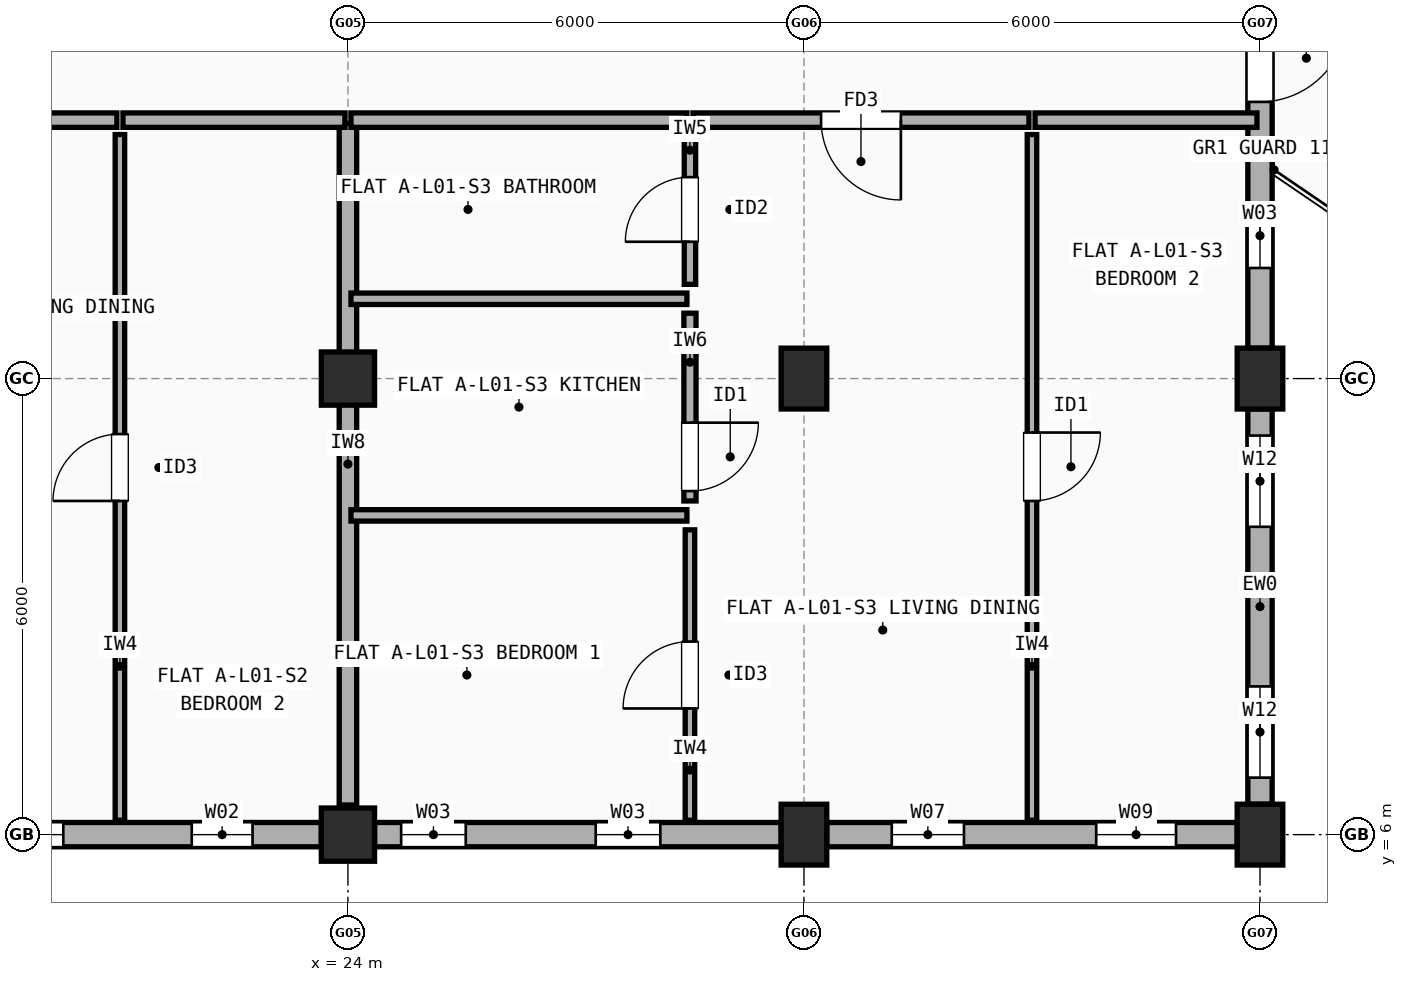
"""IFC4 building model, lengths in metres.
Left out: names, types, materials, properties, quantities, classifications, styles, units other than length and angle.
Written with IfcOpenShell. Run it as: python <this file> out.ifc"""

import sys

from ifc_helpers import new_model, si_unit, direction, frame, frame_2d, origin, origin_2d, place, context, subcontext, project, spatial, rectangle, extrude, element, fill, save


model = new_model("IFC4")
c1 = context("Model", 3, precision=1e-05, world=origin(), true_north=direction((0.0, 1.0)))
c2 = subcontext(c1, "Body", "Model", "MODEL_VIEW")
j1 = project(units=[si_unit("LENGTHUNIT", "METRE"), si_unit("PLANEANGLEUNIT", "RADIAN")], contexts=[c1])
p1 = place(None, origin())
s1 = spatial("IfcSite", under=j1, at=p1, CompositionType="ELEMENT")
p2 = place(p1, origin())
s2 = spatial("IfcBuilding", under=s1, at=p2, CompositionType="ELEMENT")
p3 = place(p2, frame((0.0, 0.0, 4.5)))
s3 = spatial("IfcBuildingStorey", under=s2, at=p3, CompositionType="ELEMENT", Elevation=4.5)
for number, where, z_axis, x_axis in (
    (1, (24.0, 6.0, 0.0), (0.0, 0.0, 1.0), (1.0, 0.0, 0.0)),
    (2, (24.0, 12.0, 0.0), (0.0, 0.0, 1.0), (1.0, 0.0, 0.0)),
):
    element("IfcColumn", number, at=place(p3, frame(where, z_axis=z_axis, x_axis=x_axis)), inside=s3, PredefinedType="COLUMN", context=c2, shape_type="SweptSolid", body=[
        extrude(rectangle(XDim=0.7, YDim=0.7, at=origin_2d()), origin(), (0.0, 0.0, 1.0), 2.945),
    ])
for number, where, z_axis, x_axis in (
    (3, (30.0, 6.0, 0.0), (0.0, 0.0, 1.0), (1.0, 0.0, 0.0)),
    (4, (30.0, 12.0, 0.0), (0.0, 0.0, 1.0), (1.0, 0.0, 0.0)),
    (5, (36.0, 6.0, 0.0), (0.0, 0.0, 1.0), (1.0, 0.0, 0.0)),
    (6, (36.0, 12.0, 0.0), (0.0, 0.0, 1.0), (1.0, 0.0, 0.0)),
):
    element("IfcColumn", number, at=place(p3, frame(where, z_axis=z_axis, x_axis=x_axis)), inside=s3, PredefinedType="COLUMN", context=c2, shape_type="SweptSolid", body=[
        extrude(rectangle(XDim=0.6, YDim=0.8, at=origin_2d()), origin(), (0.0, 0.0, 1.0), 2.945),
    ])
p4 = place(p3, frame((18.35, 6.0, 0.0), z_axis=(0.0, 0.0, 1.0), x_axis=(1.0, 0.0, 0.0)))
e7 = element("IfcWall", 7, at=p4, inside=s3, PredefinedType="STANDARD", context=c2, shape_type="SweptSolid", body=[
    extrude(rectangle(XDim=5.3, YDim=0.32, at=frame_2d((2.65, 0.0))), origin(), (0.0, 0.0, 1.0), 2.427),
])
p5 = place(p4, frame((0.705, 0.0, 0.9)))
e8 = element("IfcOpeningElement", 8, at=p5, cuts=e7, PredefinedType="OPENING", context=c2, shape_type="SweptSolid", body=[
    extrude(rectangle(XDim=1.2, YDim=1.35, at=frame_2d((0.6, 0.675))), frame((0.0, 0.17, 0.0), z_axis=(0.0, -1.0, 0.0), x_axis=(1.0, 0.0, 0.0)), (0.0, 0.0, 1.0), 0.34),
])
p6 = place(p4, frame((3.595, 0.0, 0.9)))
e9 = element("IfcOpeningElement", 9, at=p6, cuts=e7, PredefinedType="OPENING", context=c2, shape_type="SweptSolid", body=[
    extrude(rectangle(XDim=0.8, YDim=1.2, at=frame_2d((0.4, 0.6))), frame((0.0, 0.17, 0.0), z_axis=(0.0, -1.0, 0.0), x_axis=(1.0, 0.0, 0.0)), (0.0, 0.0, 1.0), 0.34),
])
p7 = place(p3, frame((24.35, 6.0, 0.0), z_axis=(0.0, 0.0, 1.0), x_axis=(1.0, 0.0, 0.0)))
e10 = element("IfcWall", 10, at=p7, inside=s3, PredefinedType="STANDARD", context=c2, shape_type="SweptSolid", body=[
    extrude(rectangle(XDim=5.35, YDim=0.32, at=frame_2d((2.675, 0.0))), origin(), (0.0, 0.0, 1.0), 2.427),
])
p8 = place(p7, frame((0.35, 0.0, 0.9)))
e11 = element("IfcOpeningElement", 11, at=p8, cuts=e10, PredefinedType="OPENING", context=c2, shape_type="SweptSolid", body=[
    extrude(rectangle(XDim=0.85, YDim=1.25, at=frame_2d((0.425, 0.625))), frame((0.0, 0.17, 0.0), z_axis=(0.0, -1.0, 0.0), x_axis=(1.0, 0.0, 0.0)), (0.0, 0.0, 1.0), 0.34),
])
p9 = place(p7, frame((2.91, 0.0, 0.9)))
e12 = element("IfcOpeningElement", 12, at=p9, cuts=e10, PredefinedType="OPENING", context=c2, shape_type="SweptSolid", body=[
    extrude(rectangle(XDim=0.85, YDim=1.25, at=frame_2d((0.425, 0.625))), frame((0.0, 0.17, 0.0), z_axis=(0.0, -1.0, 0.0), x_axis=(1.0, 0.0, 0.0)), (0.0, 0.0, 1.0), 0.34),
])
p10 = place(p3, frame((30.3, 6.0, 0.0), z_axis=(0.0, 0.0, 1.0), x_axis=(1.0, 0.0, 0.0)))
e13 = element("IfcWall", 13, at=p10, inside=s3, PredefinedType="STANDARD", context=c2, shape_type="SweptSolid", body=[
    extrude(rectangle(XDim=5.4, YDim=0.32, at=frame_2d((2.7, 0.0))), origin(), (0.0, 0.0, 1.0), 2.427),
])
p11 = place(p10, frame((0.855, 0.0, 0.9)))
e14 = element("IfcOpeningElement", 14, at=p11, cuts=e13, PredefinedType="OPENING", context=c2, shape_type="SweptSolid", body=[
    extrude(rectangle(XDim=0.95, YDim=1.35, at=frame_2d((0.475, 0.675))), frame((0.0, 0.17, 0.0), z_axis=(0.0, -1.0, 0.0), x_axis=(1.0, 0.0, 0.0)), (0.0, 0.0, 1.0), 0.34),
])
p12 = place(p10, frame((3.545, 0.0, 0.9)))
e15 = element("IfcOpeningElement", 15, at=p12, cuts=e13, PredefinedType="OPENING", context=c2, shape_type="SweptSolid", body=[
    extrude(rectangle(XDim=1.05, YDim=1.35, at=frame_2d((0.525, 0.675))), frame((0.0, 0.17, 0.0), z_axis=(0.0, -1.0, 0.0), x_axis=(1.0, 0.0, 0.0)), (0.0, 0.0, 1.0), 0.34),
])
p13 = place(p3, frame((36.0, 6.4, 0.0), z_axis=(0.0, 0.0, 1.0), x_axis=(0.0, 1.0, 0.0)))
e16 = element("IfcWall", 16, at=p13, inside=s3, PredefinedType="STANDARD", context=c2, shape_type="SweptSolid", body=[
    extrude(rectangle(XDim=5.2, YDim=0.32, at=frame_2d((2.6, 0.0))), origin(), (0.0, 0.0, 1.0), 2.427),
])
p14 = place(p13, frame((0.35, 0.0, 0.9)))
e17 = element("IfcOpeningElement", 17, at=p14, cuts=e16, PredefinedType="OPENING", context=c2, shape_type="SweptSolid", body=[
    extrude(rectangle(XDim=1.2, YDim=1.35, at=frame_2d((0.6, 0.675))), frame((0.0, 0.17, 0.0), z_axis=(0.0, -1.0, 0.0), x_axis=(1.0, 0.0, 0.0)), (0.0, 0.0, 1.0), 0.34),
])
p15 = place(p13, frame((3.65, 0.0, 0.9)))
e18 = element("IfcOpeningElement", 18, at=p15, cuts=e16, PredefinedType="OPENING", context=c2, shape_type="SweptSolid", body=[
    extrude(rectangle(XDim=1.2, YDim=1.35, at=frame_2d((0.6, 0.675))), frame((0.0, 0.17, 0.0), z_axis=(0.0, -1.0, 0.0), x_axis=(1.0, 0.0, 0.0)), (0.0, 0.0, 1.0), 0.34),
])
p16 = place(p3, frame((36.0, 12.4, 0.0), z_axis=(0.0, 0.0, 1.0), x_axis=(0.0, 1.0, 0.0)))
e19 = element("IfcWall", 19, at=p16, inside=s3, PredefinedType="STANDARD", context=c2, shape_type="SweptSolid", body=[
    extrude(rectangle(XDim=5.2, YDim=0.32, at=frame_2d((2.6, 0.0))), origin(), (0.0, 0.0, 1.0), 2.427),
])
p17 = place(p16, frame((3.24, 0.0, 0.0)))
e20 = element("IfcOpeningElement", 20, at=p17, cuts=e19, PredefinedType="OPENING", context=c2, shape_type="SweptSolid", body=[
    extrude(rectangle(XDim=1.15, YDim=2.15, at=frame_2d((0.575, 1.075))), frame((0.0, 0.17, 0.0), z_axis=(0.0, -1.0, 0.0), x_axis=(1.0, 0.0, 0.0)), (0.0, 0.0, 1.0), 0.34),
])
p18 = place(p16, frame((1.055, 0.0, 0.9)))
e21 = element("IfcOpeningElement", 21, at=p18, cuts=e19, PredefinedType="OPENING", context=c2, shape_type="SweptSolid", body=[
    extrude(rectangle(XDim=0.85, YDim=1.25, at=frame_2d((0.425, 0.625))), frame((0.0, 0.17, 0.0), z_axis=(0.0, -1.0, 0.0), x_axis=(1.0, 0.0, 0.0)), (0.0, 0.0, 1.0), 0.34),
])
p19 = place(p3, frame((24.0, 6.39, 0.0), z_axis=(0.0, 0.0, 1.0), x_axis=(0.0, 1.0, 0.0)))
e22 = element("IfcWall", 22, at=p19, inside=s3, PredefinedType="SOLIDWALL", context=c2, shape_type="SweptSolid", body=[
    extrude(rectangle(XDim=8.97, YDim=0.23, at=frame_2d((4.485, 0.0))), origin(), (0.0, 0.0, 1.0), 2.327),
])
p20 = place(p3, frame((16.54, 15.4, 0.0), z_axis=(0.0, 0.0, 1.0), x_axis=(1.0, 0.0, 0.0)))
e23 = element("IfcWall", 23, at=p20, inside=s3, PredefinedType="SOLIDWALL", context=c2, shape_type="SweptSolid", body=[
    extrude(rectangle(XDim=4.42, YDim=0.19, at=frame_2d((2.21, 0.0))), origin(), (0.0, 0.0, 1.0), 2.327),
])
p21 = place(p20, frame((1.71, 0.0, 0.0)))
e24 = element("IfcOpeningElement", 24, at=p21, cuts=e23, PredefinedType="OPENING", context=c2, shape_type="SweptSolid", body=[
    extrude(rectangle(XDim=1.0, YDim=2.15, at=frame_2d((0.5, 1.075))), frame((0.0, 0.105, 0.0), z_axis=(0.0, -1.0, 0.0), x_axis=(1.0, 0.0, 0.0)), (0.0, 0.0, 1.0), 0.21),
])
p22 = place(p3, frame((21.04, 15.4, 0.0), z_axis=(0.0, 0.0, 1.0), x_axis=(1.0, 0.0, 0.0)))
e25 = element("IfcWall", 25, at=p22, inside=s3, PredefinedType="SOLIDWALL", context=c2, shape_type="SweptSolid", body=[
    extrude(rectangle(XDim=2.92, YDim=0.19, at=frame_2d((1.46, 0.0))), origin(), (0.0, 0.0, 1.0), 2.327),
])
p23 = place(p3, frame((21.0, 6.19, 0.0), z_axis=(0.0, 0.0, 1.0), x_axis=(0.0, 1.0, 0.0)))
e26 = element("IfcWall", 26, at=p23, inside=s3, PredefinedType="PARTITIONING", context=c2, shape_type="SweptSolid", body=[
    extrude(rectangle(XDim=9.02, YDim=0.125, at=frame_2d((4.51, 0.0))), origin(), (0.0, 0.0, 1.0), 2.377),
])
p24 = place(p23, frame((4.2, 0.0, 0.0)))
e27 = element("IfcOpeningElement", 27, at=p24, cuts=e26, PredefinedType="OPENING", context=c2, shape_type="SweptSolid", body=[
    extrude(rectangle(XDim=0.88, YDim=2.1, at=frame_2d((0.44, 1.05))), frame((0.0, 0.073, 0.0), z_axis=(0.0, -1.0, 0.0), x_axis=(1.0, 0.0, 0.0)), (0.0, 0.0, 1.0), 0.145),
])
p25 = place(p3, frame((24.04, 15.4, 0.0), z_axis=(0.0, 0.0, 1.0), x_axis=(1.0, 0.0, 0.0)))
e28 = element("IfcWall", 28, at=p25, inside=s3, PredefinedType="SOLIDWALL", context=c2, shape_type="SweptSolid", body=[
    extrude(rectangle(XDim=4.42, YDim=0.19, at=frame_2d((2.21, 0.0))), origin(), (0.0, 0.0, 1.0), 2.327),
])
p26 = place(p3, frame((28.54, 15.4, 0.0), z_axis=(0.0, 0.0, 1.0), x_axis=(1.0, 0.0, 0.0)))
e29 = element("IfcWall", 29, at=p26, inside=s3, PredefinedType="SOLIDWALL", context=c2, shape_type="SweptSolid", body=[
    extrude(rectangle(XDim=4.42, YDim=0.19, at=frame_2d((2.21, 0.0))), origin(), (0.0, 0.0, 1.0), 2.427),
])
p27 = place(p26, frame((1.685, 0.0, 0.0)))
e30 = element("IfcOpeningElement", 30, at=p27, cuts=e29, PredefinedType="OPENING", context=c2, shape_type="SweptSolid", body=[
    extrude(rectangle(XDim=1.05, YDim=2.15, at=frame_2d((0.525, 1.075))), frame((0.0, 0.105, 0.0), z_axis=(0.0, -1.0, 0.0), x_axis=(1.0, 0.0, 0.0)), (0.0, 0.0, 1.0), 0.21),
])
p28 = place(p3, frame((28.5, 6.19, 0.0), z_axis=(0.0, 0.0, 1.0), x_axis=(0.0, 1.0, 0.0)))
e31 = element("IfcWall", 31, at=p28, inside=s3, PredefinedType="PARTITIONING", context=c2, shape_type="SweptSolid", body=[
    extrude(rectangle(XDim=3.82, YDim=0.125, at=frame_2d((1.91, 0.0))), origin(), (0.0, 0.0, 1.0), 2.945),
])
p29 = place(p28, frame((1.47, 0.0, 0.0)))
e32 = element("IfcOpeningElement", 32, at=p29, cuts=e31, PredefinedType="OPENING", context=c2, shape_type="SweptSolid", body=[
    extrude(rectangle(XDim=0.88, YDim=2.1, at=frame_2d((0.44, 1.05))), frame((0.0, 0.073, 0.0), z_axis=(0.0, -1.0, 0.0), x_axis=(1.0, 0.0, 0.0)), (0.0, 0.0, 1.0), 0.145),
])
p30 = place(p3, frame((28.5, 10.39, 0.0), z_axis=(0.0, 0.0, 1.0), x_axis=(0.0, 1.0, 0.0)))
e33 = element("IfcWall", 33, at=p30, inside=s3, PredefinedType="PLUMBINGWALL", context=c2, shape_type="SweptSolid", body=[
    extrude(rectangle(XDim=2.47, YDim=0.16, at=frame_2d((1.235, 0.0))), origin(), (0.0, 0.0, 1.0), 2.377),
])
p31 = place(p30, frame((0.13, 0.0, 0.0)))
e34 = element("IfcOpeningElement", 34, at=p31, cuts=e33, PredefinedType="OPENING", context=c2, shape_type="SweptSolid", body=[
    extrude(rectangle(XDim=0.9, YDim=2.1, at=frame_2d((0.45, 1.05))), frame((0.0, 0.09, 0.0), z_axis=(0.0, -1.0, 0.0), x_axis=(1.0, 0.0, 0.0)), (0.0, 0.0, 1.0), 0.18),
])
p32 = place(p3, frame((28.5, 13.24, 0.0), z_axis=(0.0, 0.0, 1.0), x_axis=(0.0, 1.0, 0.0)))
e35 = element("IfcWall", 35, at=p32, inside=s3, PredefinedType="PARTITIONING", context=c2, shape_type="SweptSolid", body=[
    extrude(rectangle(XDim=1.97, YDim=0.15, at=frame_2d((0.985, 0.0))), origin(), (0.0, 0.0, 1.0), 2.945),
])
p33 = place(p32, frame((0.56, 0.0, 0.0)))
e36 = element("IfcOpeningElement", 36, at=p33, cuts=e35, PredefinedType="OPENING", context=c2, shape_type="SweptSolid", body=[
    extrude(rectangle(XDim=0.85, YDim=2.1, at=frame_2d((0.425, 1.05))), frame((0.0, 0.085, 0.0), z_axis=(0.0, -1.0, 0.0), x_axis=(1.0, 0.0, 0.0)), (0.0, 0.0, 1.0), 0.17),
])
for number, where, z_axis, x_axis in (
    (37, (24.04, 10.2, 0.0), (0.0, 0.0, 1.0), (1.0, 0.0, 0.0)),
    (38, (24.04, 13.05, 0.0), (0.0, 0.0, 1.0), (1.0, 0.0, 0.0)),
):
    element("IfcWall", number, at=place(p3, frame(where, z_axis=z_axis, x_axis=x_axis)), inside=s3, PredefinedType="PARTITIONING", context=c2, shape_type="SweptSolid", body=[
        extrude(rectangle(XDim=4.42, YDim=0.15, at=frame_2d((2.21, 0.0))), origin(), (0.0, 0.0, 1.0), 2.327),
    ])
p34 = place(p3, frame((33.04, 15.4, 0.0), z_axis=(0.0, 0.0, 1.0), x_axis=(1.0, 0.0, 0.0)))
e39 = element("IfcWall", 39, at=p34, inside=s3, PredefinedType="SOLIDWALL", context=c2, shape_type="SweptSolid", body=[
    extrude(rectangle(XDim=2.92, YDim=0.19, at=frame_2d((1.46, 0.0))), origin(), (0.0, 0.0, 1.0), 2.427),
])
p35 = place(p3, frame((33.0, 6.19, 0.0), z_axis=(0.0, 0.0, 1.0), x_axis=(0.0, 1.0, 0.0)))
e40 = element("IfcWall", 40, at=p35, inside=s3, PredefinedType="PARTITIONING", context=c2, shape_type="SweptSolid", body=[
    extrude(rectangle(XDim=9.02, YDim=0.125, at=frame_2d((4.51, 0.0))), origin(), (0.0, 0.0, 1.0), 2.377),
])
p36 = place(p35, frame((4.2, 0.0, 0.0)))
e41 = element("IfcOpeningElement", 41, at=p36, cuts=e40, PredefinedType="OPENING", context=c2, shape_type="SweptSolid", body=[
    extrude(rectangle(XDim=0.9, YDim=2.1, at=frame_2d((0.45, 1.05))), frame((0.0, 0.073, 0.0), z_axis=(0.0, -1.0, 0.0), x_axis=(1.0, 0.0, 0.0)), (0.0, 0.0, 1.0), 0.145),
])
p37 = place(p5, origin())
e42 = element("IfcWindow", 42, at=p37, inside=s3, PartitioningType="SINGLE_PANEL", PredefinedType="WINDOW", context=c2, shape_type="SweptSolid", body=[
    extrude(rectangle(XDim=1.2, YDim=1.35, at=frame_2d((0.6, 0.675))), frame((0.0, 0.03, 0.0), z_axis=(0.0, -1.0, 0.0), x_axis=(1.0, 0.0, 0.0)), (0.0, 0.0, 1.0), 0.06),
])
fill(e8, e42)
p38 = place(p6, origin())
e43 = element("IfcWindow", 43, at=p38, inside=s3, PartitioningType="SINGLE_PANEL", PredefinedType="WINDOW", context=c2, shape_type="SweptSolid", body=[
    extrude(rectangle(XDim=0.8, YDim=1.2, at=frame_2d((0.4, 0.6))), frame((0.0, 0.03, 0.0), z_axis=(0.0, -1.0, 0.0), x_axis=(1.0, 0.0, 0.0)), (0.0, 0.0, 1.0), 0.06),
])
fill(e9, e43)
p39 = place(p8, origin())
e44 = element("IfcWindow", 44, at=p39, inside=s3, PartitioningType="SINGLE_PANEL", PredefinedType="WINDOW", context=c2, shape_type="SweptSolid", body=[
    extrude(rectangle(XDim=0.85, YDim=1.25, at=frame_2d((0.425, 0.625))), frame((0.0, 0.03, 0.0), z_axis=(0.0, -1.0, 0.0), x_axis=(1.0, 0.0, 0.0)), (0.0, 0.0, 1.0), 0.06),
])
fill(e11, e44)
p40 = place(p9, origin())
e45 = element("IfcWindow", 45, at=p40, inside=s3, PartitioningType="SINGLE_PANEL", PredefinedType="WINDOW", context=c2, shape_type="SweptSolid", body=[
    extrude(rectangle(XDim=0.85, YDim=1.25, at=frame_2d((0.425, 0.625))), frame((0.0, 0.03, 0.0), z_axis=(0.0, -1.0, 0.0), x_axis=(1.0, 0.0, 0.0)), (0.0, 0.0, 1.0), 0.06),
])
fill(e12, e45)
p41 = place(p11, origin())
e46 = element("IfcWindow", 46, at=p41, inside=s3, PartitioningType="SINGLE_PANEL", PredefinedType="WINDOW", context=c2, shape_type="SweptSolid", body=[
    extrude(rectangle(XDim=0.95, YDim=1.35, at=frame_2d((0.475, 0.675))), frame((0.0, 0.03, 0.0), z_axis=(0.0, -1.0, 0.0), x_axis=(1.0, 0.0, 0.0)), (0.0, 0.0, 1.0), 0.06),
])
fill(e14, e46)
p42 = place(p12, origin())
e47 = element("IfcWindow", 47, at=p42, inside=s3, PartitioningType="SINGLE_PANEL", PredefinedType="WINDOW", context=c2, shape_type="SweptSolid", body=[
    extrude(rectangle(XDim=1.05, YDim=1.35, at=frame_2d((0.525, 0.675))), frame((0.0, 0.03, 0.0), z_axis=(0.0, -1.0, 0.0), x_axis=(1.0, 0.0, 0.0)), (0.0, 0.0, 1.0), 0.06),
])
fill(e15, e47)
p43 = place(p14, origin())
e48 = element("IfcWindow", 48, at=p43, inside=s3, PartitioningType="SINGLE_PANEL", PredefinedType="WINDOW", context=c2, shape_type="SweptSolid", body=[
    extrude(rectangle(XDim=1.2, YDim=1.35, at=frame_2d((0.6, 0.675))), frame((0.0, 0.03, 0.0), z_axis=(0.0, -1.0, 0.0), x_axis=(1.0, 0.0, 0.0)), (0.0, 0.0, 1.0), 0.06),
])
fill(e17, e48)
p44 = place(p15, origin())
e49 = element("IfcWindow", 49, at=p44, inside=s3, PartitioningType="SINGLE_PANEL", PredefinedType="WINDOW", context=c2, shape_type="SweptSolid", body=[
    extrude(rectangle(XDim=1.2, YDim=1.35, at=frame_2d((0.6, 0.675))), frame((0.0, 0.03, 0.0), z_axis=(0.0, -1.0, 0.0), x_axis=(1.0, 0.0, 0.0)), (0.0, 0.0, 1.0), 0.06),
])
fill(e18, e49)
p45 = place(p17, frame((1.15, 0.0, 0.0), z_axis=(0.0, 0.0, 1.0), x_axis=(-1.0, 0.0, 0.0)))
e50 = element("IfcDoor", 50, at=p45, inside=s3, OperationType="SINGLE_SWING_RIGHT", PredefinedType="DOOR", context=c2, shape_type="SweptSolid", body=[
    extrude(rectangle(XDim=1.15, YDim=2.15, at=frame_2d((0.575, 1.075))), frame((0.0, 0.025, 0.0), z_axis=(0.0, -1.0, 0.0), x_axis=(1.0, 0.0, 0.0)), (0.0, 0.0, 1.0), 0.05),
])
fill(e20, e50)
p46 = place(p18, origin())
e51 = element("IfcWindow", 51, at=p46, inside=s3, PartitioningType="SINGLE_PANEL", PredefinedType="WINDOW", context=c2, shape_type="SweptSolid", body=[
    extrude(rectangle(XDim=0.85, YDim=1.25, at=frame_2d((0.425, 0.625))), frame((0.0, 0.03, 0.0), z_axis=(0.0, -1.0, 0.0), x_axis=(1.0, 0.0, 0.0)), (0.0, 0.0, 1.0), 0.06),
])
fill(e21, e51)
p47 = place(p24, origin())
e52 = element("IfcDoor", 52, at=p47, inside=s3, OperationType="SINGLE_SWING_LEFT", PredefinedType="DOOR", context=c2, shape_type="SweptSolid", body=[
    extrude(rectangle(XDim=0.88, YDim=2.1, at=frame_2d((0.44, 1.05))), frame((0.0, 0.025, 0.0), z_axis=(0.0, -1.0, 0.0), x_axis=(1.0, 0.0, 0.0)), (0.0, 0.0, 1.0), 0.05),
])
fill(e27, e52)
p48 = place(p27, origin())
e53 = element("IfcDoor", 53, at=p48, inside=s3, OperationType="SINGLE_SWING_RIGHT", PredefinedType="DOOR", context=c2, shape_type="SweptSolid", body=[
    extrude(rectangle(XDim=1.05, YDim=2.15, at=frame_2d((0.525, 1.075))), frame((0.0, 0.025, 0.0), z_axis=(0.0, -1.0, 0.0), x_axis=(1.0, 0.0, 0.0)), (0.0, 0.0, 1.0), 0.05),
])
fill(e30, e53)
p49 = place(p29, origin())
e54 = element("IfcDoor", 54, at=p49, inside=s3, OperationType="SINGLE_SWING_LEFT", PredefinedType="DOOR", context=c2, shape_type="SweptSolid", body=[
    extrude(rectangle(XDim=0.88, YDim=2.1, at=frame_2d((0.44, 1.05))), frame((0.0, 0.025, 0.0), z_axis=(0.0, -1.0, 0.0), x_axis=(1.0, 0.0, 0.0)), (0.0, 0.0, 1.0), 0.05),
])
fill(e32, e54)
p50 = place(p31, origin())
e55 = element("IfcDoor", 55, at=p50, inside=s3, OperationType="SINGLE_SWING_RIGHT", PredefinedType="DOOR", context=c2, shape_type="SweptSolid", body=[
    extrude(rectangle(XDim=0.9, YDim=2.1, at=frame_2d((0.45, 1.05))), frame((0.0, 0.025, 0.0), z_axis=(0.0, -1.0, 0.0), x_axis=(1.0, 0.0, 0.0)), (0.0, 0.0, 1.0), 0.05),
])
fill(e34, e55)
p51 = place(p33, origin())
e56 = element("IfcDoor", 56, at=p51, inside=s3, OperationType="SINGLE_SWING_LEFT", PredefinedType="DOOR", context=c2, shape_type="SweptSolid", body=[
    extrude(rectangle(XDim=0.85, YDim=2.1, at=frame_2d((0.425, 1.05))), frame((0.0, 0.025, 0.0), z_axis=(0.0, -1.0, 0.0), x_axis=(1.0, 0.0, 0.0)), (0.0, 0.0, 1.0), 0.05),
])
fill(e36, e56)
p52 = place(p36, origin())
e57 = element("IfcDoor", 57, at=p52, inside=s3, OperationType="SINGLE_SWING_RIGHT", PredefinedType="DOOR", context=c2, shape_type="SweptSolid", body=[
    extrude(rectangle(XDim=0.9, YDim=2.1, at=frame_2d((0.45, 1.05))), frame((0.0, 0.025, 0.0), z_axis=(0.0, -1.0, 0.0), x_axis=(1.0, 0.0, 0.0)), (0.0, 0.0, 1.0), 0.05),
])
fill(e41, e57)
save(model, sys.argv[1])
